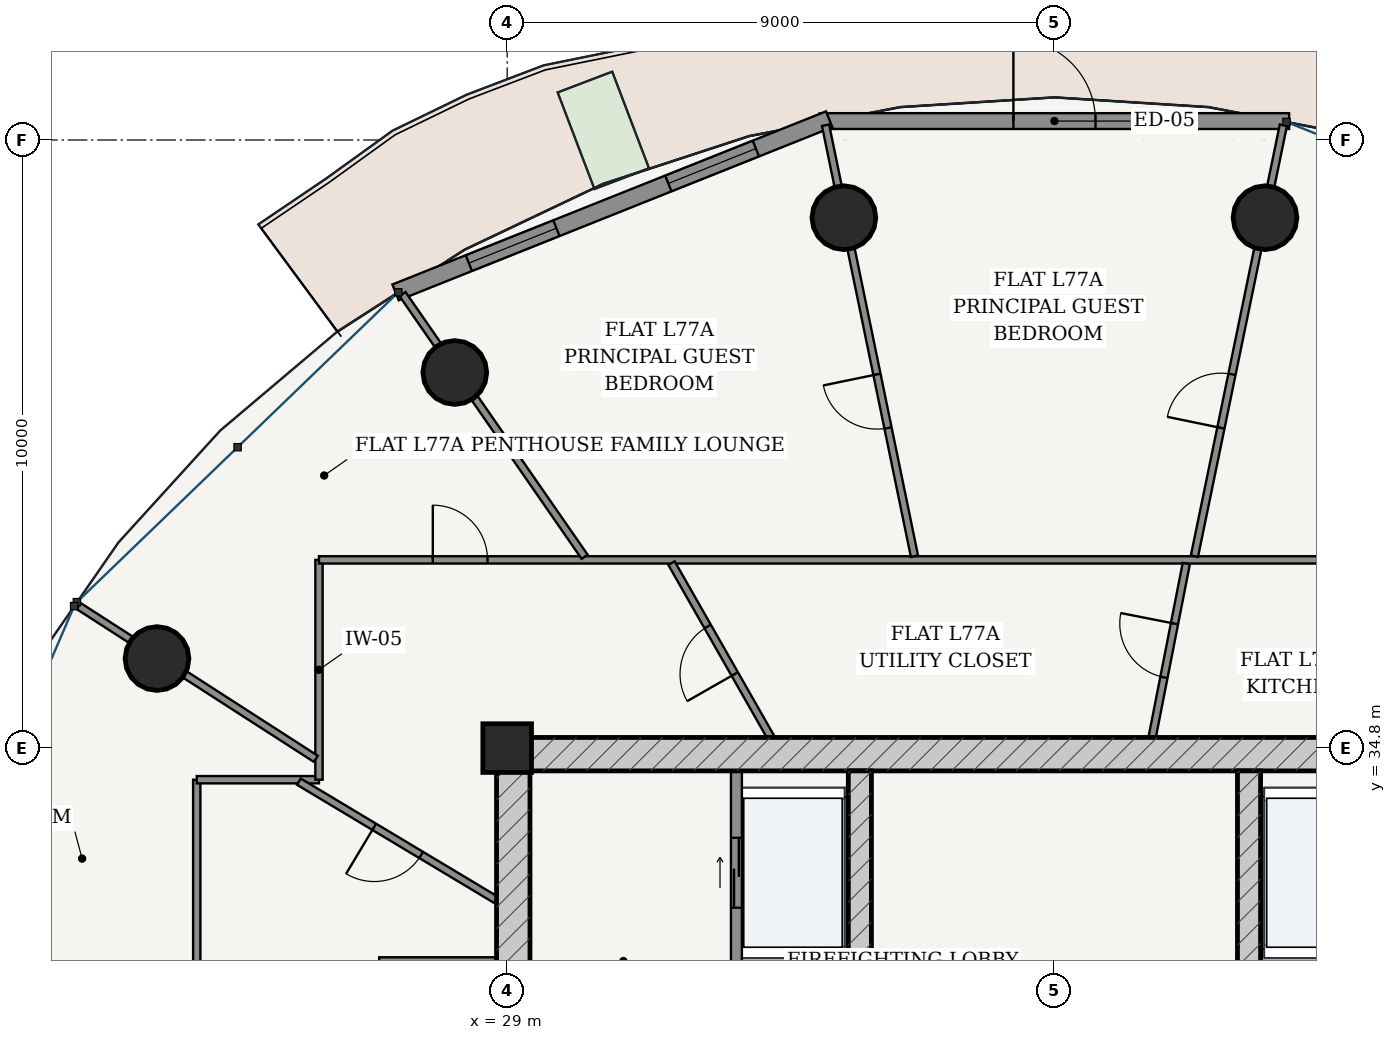
"""IFC4 building model, lengths in metres.
Left out: names, types, materials, properties, quantities, classifications, styles, units other than length and angle.
Written with IfcOpenShell. Run it as: python <this file> out.ifc"""

import sys

from ifc_helpers import new_model, si_unit, direction, frame, frame_2d, origin, origin_2d, place, context, subcontext, project, spatial, rectangle, hollow_circle, extrude, source, transform, mapped, element, fill, save


model = new_model("IFC4")
c1 = context("Model", 3, precision=1e-05, world=origin(), true_north=direction((-0.2419218956, 0.970295726276)))
c2 = subcontext(c1, "Body", "Model", "MODEL_VIEW")
j1 = project(units=[si_unit("LENGTHUNIT", "METRE"), si_unit("PLANEANGLEUNIT", "RADIAN")], contexts=[c1])
p1 = place(None, origin())
s1 = spatial("IfcSite", under=j1, at=p1, CompositionType="ELEMENT")
p2 = place(p1, origin())
s2 = spatial("IfcBuilding", under=s1, at=p2, CompositionType="ELEMENT")
p3 = place(p2, frame((0.0, 0.0, 293.2)))
s3 = spatial("IfcBuildingStorey", under=s2, at=p3, CompositionType="ELEMENT", Elevation=293.2)
p4 = place(p3, frame((29.0, 34.8, 0.0), z_axis=(0.0, 0.0, 1.0), x_axis=(1.0, 0.0, 0.0)))
e1 = element("IfcColumn", 1, at=p4, inside=s3, PredefinedType="COLUMN", context=c2, shape_type="SweptSolid", body=[
    extrude(rectangle(XDim=0.8, YDim=0.8, at=origin_2d()), origin(), (0.0, 0.0, 1.0), 3.75),
])
p5 = place(p3, frame((28.825, 34.7, 0.0), z_axis=(0.0, 0.0, 1.0), x_axis=(1.0, 0.0, 0.0)))
e2 = element("IfcWall", 2, at=p5, inside=s3, PredefinedType="SHEAR", context=c2, shape_type="SweptSolid", body=[
    extrude(rectangle(XDim=18.35, YDim=0.55, at=frame_2d((9.175, 0.0))), origin(), (0.0, 0.0, 1.0), 3.49),
])
p6 = place(p3, frame((29.1, 19.175, 0.0), z_axis=(0.0, 0.0, 1.0), x_axis=(0.0, 1.0, 0.0)))
e3 = element("IfcWall", 3, at=p6, inside=s3, PredefinedType="SHEAR", context=c2, shape_type="SweptSolid", body=[
    extrude(rectangle(XDim=15.25, YDim=0.55, at=frame_2d((7.625, 0.0))), origin(), (0.0, 0.0, 1.0), 3.49),
])
p7 = place(p6, frame((9.875, 0.0, 0.0)))
e4 = element("IfcOpeningElement", 4, at=p7, cuts=e3, PredefinedType="OPENING", context=c2, shape_type="SweptSolid", body=[
    extrude(rectangle(XDim=1.5, YDim=2.2, at=frame_2d((0.75, 1.1))), frame((0.0, 0.285, 0.0), z_axis=(0.0, -1.0, 0.0), x_axis=(1.0, 0.0, 0.0)), (0.0, 0.0, 1.0), 0.57),
])
p8 = place(p3, frame((34.8, 19.175, 0.0), z_axis=(0.0, 0.0, 1.0), x_axis=(0.0, 1.0, 0.0)))
e5 = element("IfcWall", 5, at=p8, inside=s3, PredefinedType="SHEAR", context=c2, shape_type="SweptSolid", body=[
    extrude(rectangle(XDim=15.25, YDim=0.38, at=frame_2d((7.625, 0.0))), origin(), (0.0, 0.0, 1.0), 3.49),
])
p9 = place(p8, frame((7.8, 0.0, 0.0)))
e6 = element("IfcOpeningElement", 6, at=p9, cuts=e5, PredefinedType="OPENING", context=c2, shape_type="SweptSolid", body=[
    extrude(rectangle(XDim=1.05, YDim=2.15, at=frame_2d((0.525, 1.075))), frame((0.0, 0.2, 0.0), z_axis=(0.0, -1.0, 0.0), x_axis=(1.0, 0.0, 0.0)), (0.0, 0.0, 1.0), 0.4),
])
p10 = place(p3, frame((41.2, 19.175, 0.0), z_axis=(0.0, 0.0, 1.0), x_axis=(0.0, 1.0, 0.0)))
e7 = element("IfcWall", 7, at=p10, inside=s3, PredefinedType="SHEAR", context=c2, shape_type="SweptSolid", body=[
    extrude(rectangle(XDim=15.25, YDim=0.38, at=frame_2d((7.625, 0.0))), origin(), (0.0, 0.0, 1.0), 3.49),
])
p11 = place(p10, frame((7.8, 0.0, 0.0)))
e8 = element("IfcOpeningElement", 8, at=p11, cuts=e7, PredefinedType="OPENING", context=c2, shape_type="SweptSolid", body=[
    extrude(rectangle(XDim=1.05, YDim=2.15, at=frame_2d((0.525, 1.075))), frame((0.0, 0.2, 0.0), z_axis=(0.0, -1.0, 0.0), x_axis=(1.0, 0.0, 0.0)), (0.0, 0.0, 1.0), 0.4),
])
for number, where, z_axis, x_axis in (
    (9, (41.463, 43.522, 0.0), (0.0, 0.0, 1.0), (1.0, 0.0, 0.0)),
    (10, (34.537, 43.522, 0.0), (0.0, 0.0, 1.0), (1.0, 0.0, 0.0)),
    (11, (28.139, 40.977, 0.0), (0.0, 0.0, 1.0), (1.0, 0.0, 0.0)),
    (12, (23.241, 36.272, 0.0), (0.0, 0.0, 1.0), (1.0, 0.0, 0.0)),
):
    element("IfcColumn", number, at=place(p3, frame(where, z_axis=z_axis, x_axis=x_axis)), inside=s3, PredefinedType="COLUMN", context=c2, shape_type="SweptSolid", body=[
        extrude(hollow_circle(Radius=0.525, WallThickness=0.035, at=origin_2d()), origin(), (0.0, 0.0, 1.0), 3.75),
    ])
p12 = place(p3, frame((41.859, 45.111, 0.0), z_axis=(0.0, 0.0, 1.0), x_axis=(-1.0, 0.0, 0.0)))
e13 = element("IfcWall", 13, at=p12, inside=s3, PredefinedType="SOLIDWALL", context=c2, shape_type="SweptSolid", body=[
    extrude(rectangle(XDim=7.718, YDim=0.26, at=frame_2d((3.859, 0.0))), origin(), (0.0, 0.0, 1.0), 3.49),
])
p13 = place(p12, frame((3.184, 0.0, 0.0)))
e14 = element("IfcOpeningElement", 14, at=p13, cuts=e13, PredefinedType="OPENING", context=c2, shape_type="SweptSolid", body=[
    extrude(rectangle(XDim=1.35, YDim=2.2, at=frame_2d((0.675, 1.1))), frame((0.0, 0.14, 0.0), z_axis=(0.0, -1.0, 0.0), x_axis=(1.0, 0.0, 0.0)), (0.0, 0.0, 1.0), 0.28),
])
p14 = place(p3, frame((34.295, 45.141, 0.0), z_axis=(0.0, 0.0, 1.0), x_axis=(-0.928724272392, -0.370771123296, 0.0)))
e15 = element("IfcWall", 15, at=p14, inside=s3, PredefinedType="SOLIDWALL", context=c2, shape_type="SweptSolid", body=[
    extrude(rectangle(XDim=7.678, YDim=0.28, at=frame_2d((3.839, 0.0))), origin(), (0.0, 0.0, 1.0), 3.49),
])
p15 = place(p14, frame((1.298, 0.0, 0.85)))
e16 = element("IfcOpeningElement", 16, at=p15, cuts=e15, PredefinedType="OPENING", context=c2, shape_type="SweptSolid", body=[
    extrude(rectangle(XDim=1.55, YDim=1.95, at=frame_2d((0.775, 0.975))), frame((0.0, 0.15, 0.0), z_axis=(0.0, -1.0, 0.0), x_axis=(1.0, 0.0, 0.0)), (0.0, 0.0, 1.0), 0.3),
])
p16 = place(p14, frame((4.83, 0.0, 0.85)))
e17 = element("IfcOpeningElement", 17, at=p16, cuts=e15, PredefinedType="OPENING", context=c2, shape_type="SweptSolid", body=[
    extrude(rectangle(XDim=1.55, YDim=1.95, at=frame_2d((0.775, 0.975))), frame((0.0, 0.15, 0.0), z_axis=(0.0, -1.0, 0.0), x_axis=(1.0, 0.0, 0.0)), (0.0, 0.0, 1.0), 0.3),
])
p17 = place(p3, frame((32.77, 28.52, 0.0), z_axis=(0.0, 0.0, 1.0), x_axis=(0.0, 1.0, 0.0)))
e18 = element("IfcWall", 18, at=p17, inside=s3, PredefinedType="PARTITIONING", context=c2, shape_type="SweptSolid", body=[
    extrude(rectangle(XDim=5.905, YDim=0.18, at=frame_2d((2.953, 0.0))), origin(), (0.0, 0.0, 1.0), 3.49),
])
p18 = place(p17, frame((3.655, 0.0, 0.0)))
e19 = element("IfcOpeningElement", 19, at=p18, cuts=e18, PredefinedType="OPENING", context=c2, shape_type="SweptSolid", body=[
    extrude(rectangle(XDim=1.15, YDim=2.2, at=frame_2d((0.575, 1.1))), frame((0.0, 0.1, 0.0), z_axis=(0.0, -1.0, 0.0), x_axis=(1.0, 0.0, 0.0)), (0.0, 0.0, 1.0), 0.2),
])
p19 = place(p17, frame((0.73, 0.0, 0.0)))
e20 = element("IfcOpeningElement", 20, at=p19, cuts=e18, PredefinedType="OPENING", context=c2, shape_type="SweptSolid", body=[
    extrude(rectangle(XDim=1.2, YDim=2.25, at=frame_2d((0.6, 1.125))), frame((0.0, 0.1, 0.0), z_axis=(0.0, -1.0, 0.0), x_axis=(1.0, 0.0, 0.0)), (0.0, 0.0, 1.0), 0.2),
])
for number, where, z_axis, x_axis in (
    (21, (32.86, 31.22, 0.0), (0.0, 0.0, 1.0), (1.0, 0.0, 0.0)),
    (22, (41.39, 31.22, 0.0), (0.0, 0.0, 1.0), (1.0, 0.0, 0.0)),
):
    element("IfcWall", number, at=place(p3, frame(where, z_axis=z_axis, x_axis=x_axis)), inside=s3, PredefinedType="PARTITIONING", context=c2, shape_type="SweptSolid", body=[
        extrude(rectangle(XDim=1.75, YDim=0.16, at=frame_2d((0.875, 0.0))), origin(), (0.0, 0.0, 1.0), 3.49),
    ])
p20 = place(p3, frame((26.895, 31.28, 0.0), z_axis=(0.0, 0.0, 1.0), x_axis=(1.0, 0.0, 0.0)))
e23 = element("IfcWall", 23, at=p20, inside=s3, PredefinedType="PARTITIONING", context=c2, shape_type="SweptSolid", body=[
    extrude(rectangle(XDim=1.93, YDim=0.16, at=frame_2d((0.965, 0.0))), origin(), (0.0, 0.0, 1.0), 3.49),
])
p21 = place(p3, frame((23.895, 26.902, 0.0), z_axis=(0.0, 0.0, 1.0), x_axis=(0.0, 1.0, 0.0)))
e24 = element("IfcWall", 24, at=p21, inside=s3, PredefinedType="PARTITIONING", context=c2, shape_type="SweptSolid", body=[
    extrude(rectangle(XDim=7.378, YDim=0.12, at=frame_2d((3.689, 0.0))), origin(), (0.0, 0.0, 1.0), 3.015),
])
p22 = place(p21, frame((3.239, 0.0, 0.0)))
e25 = element("IfcOpeningElement", 25, at=p22, cuts=e24, PredefinedType="OPENING", context=c2, shape_type="SweptSolid", body=[
    extrude(rectangle(XDim=0.9, YDim=2.15, at=frame_2d((0.45, 1.075))), frame((0.0, 0.07, 0.0), z_axis=(0.0, -1.0, 0.0), x_axis=(1.0, 0.0, 0.0)), (0.0, 0.0, 1.0), 0.14),
])
p23 = place(p3, frame((23.895, 34.28, 0.0), z_axis=(0.0, 0.0, 1.0), x_axis=(1.0, 0.0, 0.0)))
e26 = element("IfcWall", 26, at=p23, inside=s3, PredefinedType="PARTITIONING", context=c2, shape_type="SweptSolid", body=[
    extrude(rectangle(XDim=2.01, YDim=0.12, at=frame_2d((1.005, 0.0))), origin(), (0.0, 0.0, 1.0), 3.209),
])
p24 = place(p3, frame((25.905, 34.28, 0.0), z_axis=(0.0, 0.0, 1.0), x_axis=(0.0, 1.0, 0.0)))
e27 = element("IfcWall", 27, at=p24, inside=s3, PredefinedType="PARTITIONING", context=c2, shape_type="SweptSolid", body=[
    extrude(rectangle(XDim=3.615, YDim=0.12, at=frame_2d((1.808, 0.0))), origin(), (0.0, 0.0, 1.0), 3.015),
])
p25 = place(p3, frame((25.905, 37.895, 0.0), z_axis=(0.0, 0.0, 1.0), x_axis=(1.0, 0.0, 0.0)))
e28 = element("IfcWall", 28, at=p25, inside=s3, PredefinedType="PARTITIONING", context=c2, shape_type="SweptSolid", body=[
    extrude(rectangle(XDim=24.19, YDim=0.12, at=frame_2d((12.095, 0.0))), origin(), (0.0, 0.0, 1.0), 3.015),
])
p26 = place(p25, frame((21.621, 0.0, 0.0)))
e29 = element("IfcOpeningElement", 29, at=p26, cuts=e28, PredefinedType="OPENING", context=c2, shape_type="SweptSolid", body=[
    extrude(rectangle(XDim=0.9, YDim=2.15, at=frame_2d((0.45, 1.075))), frame((0.0, 0.07, 0.0), z_axis=(0.0, -1.0, 0.0), x_axis=(1.0, 0.0, 0.0)), (0.0, 0.0, 1.0), 0.14),
])
p27 = place(p25, frame((16.661, 0.0, 0.0)))
e30 = element("IfcOpeningElement", 30, at=p27, cuts=e28, PredefinedType="OPENING", context=c2, shape_type="SweptSolid", body=[
    extrude(rectangle(XDim=0.9, YDim=2.15, at=frame_2d((0.45, 1.075))), frame((0.0, 0.07, 0.0), z_axis=(0.0, -1.0, 0.0), x_axis=(1.0, 0.0, 0.0)), (0.0, 0.0, 1.0), 0.14),
])
p28 = place(p25, frame((1.872, 0.0, 0.0)))
e31 = element("IfcOpeningElement", 31, at=p28, cuts=e28, PredefinedType="OPENING", context=c2, shape_type="SweptSolid", body=[
    extrude(rectangle(XDim=0.9, YDim=2.15, at=frame_2d((0.45, 1.075))), frame((0.0, 0.07, 0.0), z_axis=(0.0, -1.0, 0.0), x_axis=(1.0, 0.0, 0.0)), (0.0, 0.0, 1.0), 0.14),
])
p29 = place(p3, frame((40.302, 37.956, 0.0), z_axis=(0.0, 0.0, 1.0), x_axis=(0.20211361456, 0.979362081566, 0.0)))
e32 = element("IfcWall", 32, at=p29, inside=s3, PredefinedType="PARTITIONING", context=c2, shape_type="SweptSolid", body=[
    extrude(rectangle(XDim=7.237, YDim=0.12, at=frame_2d((3.618, 0.0))), origin(), (0.0, 0.0, 1.0), 3.015),
])
p30 = place(p29, frame((2.154, 0.0, 0.0)))
e33 = element("IfcOpeningElement", 33, at=p30, cuts=e32, PredefinedType="OPENING", context=c2, shape_type="SweptSolid", body=[
    extrude(rectangle(XDim=0.9, YDim=2.15, at=frame_2d((0.45, 1.075))), frame((0.0, 0.07, 0.0), z_axis=(0.0, -1.0, 0.0), x_axis=(1.0, 0.0, 0.0)), (0.0, 0.0, 1.0), 0.14),
])
p31 = place(p3, frame((35.698, 37.956, 0.0), z_axis=(0.0, 0.0, 1.0), x_axis=(-0.20211361456, 0.979362081566, 0.0)))
e34 = element("IfcWall", 34, at=p31, inside=s3, PredefinedType="PARTITIONING", context=c2, shape_type="SweptSolid", body=[
    extrude(rectangle(XDim=7.237, YDim=0.12, at=frame_2d((3.618, 0.0))), origin(), (0.0, 0.0, 1.0), 3.015),
])
p32 = place(p31, frame((2.153, 0.0, 0.0)))
e35 = element("IfcOpeningElement", 35, at=p32, cuts=e34, PredefinedType="OPENING", context=c2, shape_type="SweptSolid", body=[
    extrude(rectangle(XDim=0.9, YDim=2.15, at=frame_2d((0.45, 1.075))), frame((0.0, 0.07, 0.0), z_axis=(0.0, -1.0, 0.0), x_axis=(1.0, 0.0, 0.0)), (0.0, 0.0, 1.0), 0.14),
])
p33 = place(p3, frame((30.274, 37.946, 0.0), z_axis=(0.0, 0.0, 1.0), x_axis=(-0.569678410446, 0.821867695357, 0.0)))
e36 = element("IfcWall", 36, at=p33, inside=s3, PredefinedType="PARTITIONING", context=c2, shape_type="SweptSolid", body=[
    extrude(rectangle(XDim=5.257, YDim=0.12, at=frame_2d((2.628, 0.0))), origin(), (0.0, 0.0, 1.0), 3.015),
])
p34 = place(p3, frame((25.853, 34.624, 0.0), z_axis=(0.0, 0.0, 1.0), x_axis=(-0.840694066929, 0.541510374628, 0.0)))
e37 = element("IfcWall", 37, at=p34, inside=s3, PredefinedType="PARTITIONING", context=c2, shape_type="SweptSolid", body=[
    extrude(rectangle(XDim=4.637, YDim=0.12, at=frame_2d((2.319, 0.0))), origin(), (0.0, 0.0, 1.0), 3.015),
])
p35 = place(p3, frame((39.607, 34.977, 0.0), z_axis=(0.0, 0.0, 1.0), x_axis=(0.192841890083, 0.981229843324, 0.0)))
e38 = element("IfcWall", 38, at=p35, inside=s3, PredefinedType="PARTITIONING", context=c2, shape_type="SweptSolid", body=[
    extrude(rectangle(XDim=2.912, YDim=0.12, at=frame_2d((1.456, 0.0))), origin(), (0.0, 0.0, 1.0), 2.575),
])
p36 = place(p35, frame((1.006, 0.0, 0.0)))
e39 = element("IfcOpeningElement", 39, at=p36, cuts=e38, PredefinedType="OPENING", context=c2, shape_type="SweptSolid", body=[
    extrude(rectangle(XDim=0.9, YDim=2.15, at=frame_2d((0.45, 1.075))), frame((0.0, 0.07, 0.0), z_axis=(0.0, -1.0, 0.0), x_axis=(1.0, 0.0, 0.0)), (0.0, 0.0, 1.0), 0.14),
])
p37 = place(p3, frame((33.336, 34.977, 0.0), z_axis=(0.0, 0.0, 1.0), x_axis=(-0.495413156231, 0.86865747256, 0.0)))
e40 = element("IfcWall", 40, at=p37, inside=s3, PredefinedType="PARTITIONING", context=c2, shape_type="SweptSolid", body=[
    extrude(rectangle(XDim=3.297, YDim=0.12, at=frame_2d((1.649, 0.0))), origin(), (0.0, 0.0, 1.0), 3.49),
])
p38 = place(p37, frame((1.199, 0.0, 0.0)))
e41 = element("IfcOpeningElement", 41, at=p38, cuts=e40, PredefinedType="OPENING", context=c2, shape_type="SweptSolid", body=[
    extrude(rectangle(XDim=0.9, YDim=2.15, at=frame_2d((0.45, 1.075))), frame((0.0, 0.07, 0.0), z_axis=(0.0, -1.0, 0.0), x_axis=(1.0, 0.0, 0.0)), (0.0, 0.0, 1.0), 0.14),
])
p39 = place(p3, frame((28.825, 32.3, 0.0), z_axis=(0.0, 0.0, 1.0), x_axis=(-0.857737223377, 0.514088373369, 0.0)))
e42 = element("IfcWall", 42, at=p39, inside=s3, PredefinedType="PARTITIONING", context=c2, shape_type="SweptSolid", body=[
    extrude(rectangle(XDim=3.79, YDim=0.12, at=frame_2d((1.895, 0.0))), origin(), (0.0, 0.0, 1.0), 3.209),
])
p40 = place(p39, frame((1.445, 0.0, 0.0)))
e43 = element("IfcOpeningElement", 43, at=p40, cuts=e42, PredefinedType="OPENING", context=c2, shape_type="SweptSolid", body=[
    extrude(rectangle(XDim=0.9, YDim=2.15, at=frame_2d((0.45, 1.075))), frame((0.0, 0.07, 0.0), z_axis=(0.0, -1.0, 0.0), x_axis=(1.0, 0.0, 0.0)), (0.0, 0.0, 1.0), 0.14),
])
m1 = source(origin(), c2, "Body", "SweptSolid", [
    extrude(rectangle(XDim=1.35, YDim=2.2, at=frame_2d((0.675, 1.1))), frame((0.0, 0.025, 0.0), z_axis=(0.0, -1.0, 0.0), x_axis=(1.0, 0.0, 0.0)), (0.0, 0.0, 1.0), 0.05),
])
p41 = place(p13, frame((1.35, 0.0, 0.0), z_axis=(0.0, 0.0, 1.0), x_axis=(-1.0, 0.0, 0.0)))
e44 = element("IfcDoor", 44, at=p41, inside=s3, OperationType="SINGLE_SWING_LEFT", PredefinedType="DOOR", context=c2, shape_type="MappedRepresentation", body=[
    mapped(m1, transform((0.0, 0.0, 0.0), scale=1.0)),
])
fill(e14, e44)
m2 = source(origin(), c2, "Body", "SweptSolid", [
    extrude(rectangle(XDim=1.55, YDim=1.95, at=frame_2d((0.775, 0.975))), frame((0.0, 0.03, 0.0), z_axis=(0.0, -1.0, 0.0), x_axis=(1.0, 0.0, 0.0)), (0.0, 0.0, 1.0), 0.06),
])
p42 = place(p15, origin())
e45 = element("IfcWindow", 45, at=p42, inside=s3, PartitioningType="SINGLE_PANEL", PredefinedType="WINDOW", context=c2, shape_type="MappedRepresentation", body=[
    mapped(m2, transform((0.0, 0.0, 0.0), scale=1.0)),
])
fill(e16, e45)
p43 = place(p16, origin())
e46 = element("IfcWindow", 46, at=p43, inside=s3, PartitioningType="SINGLE_PANEL", PredefinedType="WINDOW", context=c2, shape_type="MappedRepresentation", body=[
    mapped(m2, transform((0.0, 0.0, 0.0), scale=1.0)),
])
fill(e17, e46)
m3 = source(origin(), c2, "Body", "SweptSolid", [
    extrude(rectangle(XDim=1.15, YDim=2.2, at=frame_2d((0.575, 1.1))), frame((0.0, 0.025, 0.0), z_axis=(0.0, -1.0, 0.0), x_axis=(1.0, 0.0, 0.0)), (0.0, 0.0, 1.0), 0.05),
])
p44 = place(p18, origin())
e47 = element("IfcDoor", 47, at=p44, inside=s3, OperationType="DOUBLE_DOOR_SLIDING", PredefinedType="DOOR", context=c2, shape_type="MappedRepresentation", body=[
    mapped(m3, transform((0.0, 0.0, 0.0), scale=1.0)),
])
fill(e19, e47)
m4 = source(origin(), c2, "Body", "SweptSolid", [
    extrude(rectangle(XDim=0.9, YDim=2.15, at=frame_2d((0.45, 1.075))), frame((0.0, 0.025, 0.0), z_axis=(0.0, -1.0, 0.0), x_axis=(1.0, 0.0, 0.0)), (0.0, 0.0, 1.0), 0.05),
])
p45 = place(p36, origin())
e48 = element("IfcDoor", 48, at=p45, inside=s3, OperationType="SINGLE_SWING_RIGHT", PredefinedType="DOOR", context=c2, shape_type="MappedRepresentation", body=[
    mapped(m4, transform((0.0, 0.0, 0.0), scale=1.0)),
])
fill(e39, e48)
p46 = place(p38, origin())
e49 = element("IfcDoor", 49, at=p46, inside=s3, OperationType="SINGLE_SWING_LEFT", PredefinedType="DOOR", context=c2, shape_type="MappedRepresentation", body=[
    mapped(m4, transform((0.0, 0.0, 0.0), scale=1.0)),
])
fill(e41, e49)
p47 = place(p40, origin())
e50 = element("IfcDoor", 50, at=p47, inside=s3, OperationType="SINGLE_SWING_RIGHT", PredefinedType="DOOR", context=c2, shape_type="MappedRepresentation", body=[
    mapped(m4, transform((0.0, 0.0, 0.0), scale=1.0)),
])
fill(e43, e50)
p48 = place(p30, origin())
e51 = element("IfcDoor", 51, at=p48, inside=s3, OperationType="SINGLE_SWING_LEFT", PredefinedType="DOOR", context=c2, shape_type="MappedRepresentation", body=[
    mapped(m4, transform((0.0, 0.0, 0.0), scale=1.0)),
])
fill(e33, e51)
p49 = place(p32, origin())
e52 = element("IfcDoor", 52, at=p49, inside=s3, OperationType="SINGLE_SWING_RIGHT", PredefinedType="DOOR", context=c2, shape_type="MappedRepresentation", body=[
    mapped(m4, transform((0.0, 0.0, 0.0), scale=1.0)),
])
fill(e35, e52)
p50 = place(p28, origin())
e53 = element("IfcDoor", 53, at=p50, inside=s3, OperationType="SINGLE_SWING_LEFT", PredefinedType="DOOR", context=c2, shape_type="MappedRepresentation", body=[
    mapped(m4, transform((0.0, 0.0, 0.0), scale=1.0)),
])
fill(e31, e53)
save(model, sys.argv[1])
